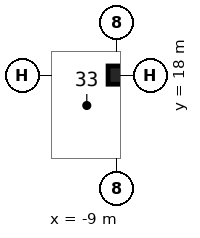
"""IFC4 building model, lengths in metres.
Left out: names, types, materials, properties, quantities, classifications, styles, units other than length and angle.
Written with IfcOpenShell. Run it as: python <this file> out.ifc"""

import sys

from ifc_helpers import new_model, si_unit, direction, frame, origin, origin_2d, place, context, subcontext, project, spatial, rectangle, extrude, element, save


model = new_model("IFC4")
c1 = context("Model", 3, precision=1e-05, world=origin(), true_north=direction((0.0, 1.0)))
c2 = subcontext(c1, "Body", "Model", "MODEL_VIEW")
j1 = project(units=[si_unit("LENGTHUNIT", "METRE"), si_unit("PLANEANGLEUNIT", "RADIAN")], contexts=[c1])
p1 = place(None, origin())
s1 = spatial("IfcSite", under=j1, at=p1, CompositionType="ELEMENT")
p2 = place(p1, origin())
s2 = spatial("IfcBuilding", under=s1, at=p2, CompositionType="ELEMENT")
p3 = place(p2, frame((0.0, 0.0, -9.0)))
s3 = spatial("IfcBuildingStorey", under=s2, at=p3, CompositionType="ELEMENT", Elevation=-9.0)
p4 = place(p3, frame((-9.0, 18.0, 0.0), z_axis=(0.0, 0.0, 1.0), x_axis=(1.0, 0.0, 0.0)))
e1 = element("IfcColumn", 1, at=p4, inside=s3, PredefinedType="COLUMN", context=c2, shape_type="SweptSolid", body=[
    extrude(rectangle(XDim=1.2, YDim=1.2, at=origin_2d()), origin(), (0.0, 0.0, 1.0), 4.5),
])
save(model, sys.argv[1])
